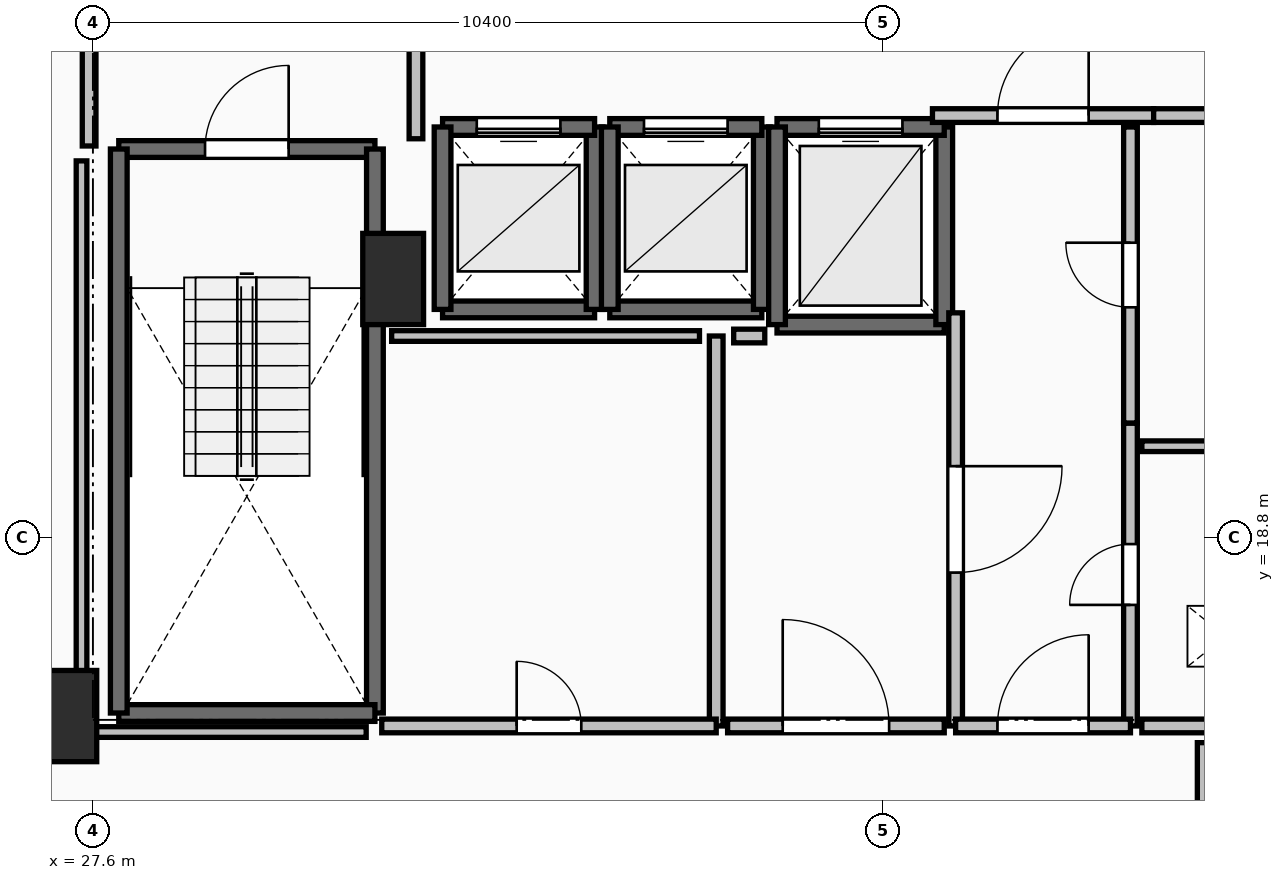
"""IFC4 building model, lengths in metres.
Left out: names, types, materials, properties, quantities, classifications, styles, units other than length and angle.
Written with IfcOpenShell. Run it as: python <this file> out.ifc"""

import sys

from ifc_helpers import new_model, si_unit, direction, frame, frame_2d, origin, origin_2d, place, context, subcontext, project, spatial, rectangle, extrude, element, fill, save


model = new_model("IFC4")
c1 = context("Model", 3, precision=1e-05, world=origin(), true_north=direction((0.0, 1.0)))
c2 = subcontext(c1, "Body", "Model", "MODEL_VIEW")
j1 = project(units=[si_unit("LENGTHUNIT", "METRE"), si_unit("PLANEANGLEUNIT", "RADIAN")], contexts=[c1])
p1 = place(None, origin())
s1 = spatial("IfcSite", under=j1, at=p1, CompositionType="ELEMENT")
p2 = place(p1, origin())
s2 = spatial("IfcBuilding", under=s1, at=p2, CompositionType="ELEMENT")
p3 = place(p2, frame((0.0, 0.0, 164.1)))
s3 = spatial("IfcBuildingStorey", under=s2, at=p3, CompositionType="ELEMENT", Elevation=164.1)
for number, where, z_axis, x_axis in (
    (1, (27.25, 16.45, 0.0), (0.0, 0.0, 1.0), (1.0, 0.0, 0.0)),
    (2, (31.55, 22.2, 0.0), (0.0, 0.0, 1.0), (1.0, 0.0, 0.0)),
):
    element("IfcColumn", number, at=place(p3, frame(where, z_axis=z_axis, x_axis=x_axis)), inside=s3, PredefinedType="PILASTER", context=c2, shape_type="SweptSolid", body=[
        extrude(rectangle(XDim=0.8, YDim=1.2, at=origin_2d()), origin(), (0.0, 0.0, 1.0), 3.5),
    ])
p4 = place(p3, frame((27.94, 23.91, 0.0), z_axis=(0.0, 0.0, 1.0), x_axis=(1.0, 0.0, 0.0)))
e3 = element("IfcWall", 3, at=p4, inside=s3, PredefinedType="SOLIDWALL", context=c2, shape_type="SweptSolid", body=[
    extrude(rectangle(XDim=3.37, YDim=0.22, at=frame_2d((1.685, 0.0))), origin(), (0.0, 0.0, 1.0), 3.24),
])
p5 = place(p4, frame((1.135, 0.0, 0.0)))
e4 = element("IfcOpeningElement", 4, at=p5, cuts=e3, PredefinedType="OPENING", context=c2, shape_type="SweptSolid", body=[
    extrude(rectangle(XDim=1.1, YDim=2.15, at=frame_2d((0.55, 1.075))), frame((0.0, 0.125, 0.0), z_axis=(0.0, -1.0, 0.0), x_axis=(1.0, 0.0, 0.0)), (0.0, 0.0, 1.0), 0.25),
])
p6 = place(p3, frame((31.31, 23.91, 0.0), z_axis=(0.0, 0.0, 1.0), x_axis=(0.0, -1.0, 0.0)))
e5 = element("IfcWall", 5, at=p6, inside=s3, PredefinedType="SOLIDWALL", context=c2, shape_type="SweptSolid", body=[
    extrude(rectangle(XDim=7.42, YDim=0.22, at=frame_2d((3.71, 0.0))), origin(), (0.0, 0.0, 1.0), 3.24),
])
p7 = place(p3, frame((31.31, 16.49, 0.0), z_axis=(0.0, 0.0, 1.0), x_axis=(-1.0, 0.0, 0.0)))
e6 = element("IfcWall", 6, at=p7, inside=s3, PredefinedType="SOLIDWALL", context=c2, shape_type="SweptSolid", body=[
    extrude(rectangle(XDim=3.37, YDim=0.22, at=frame_2d((1.685, 0.0))), origin(), (0.0, 0.0, 1.0), 3.24),
])
p8 = place(p3, frame((27.94, 16.49, 0.0), z_axis=(0.0, 0.0, 1.0), x_axis=(0.0, 1.0, 0.0)))
e7 = element("IfcWall", 7, at=p8, inside=s3, PredefinedType="SOLIDWALL", context=c2, shape_type="SweptSolid", body=[
    extrude(rectangle(XDim=7.42, YDim=0.22, at=frame_2d((3.71, 0.0))), origin(), (0.0, 0.0, 1.0), 3.24),
])
p9 = place(p3, frame((32.2, 21.8, 0.0), z_axis=(0.0, 0.0, 1.0), x_axis=(1.0, 0.0, 0.0)))
e8 = element("IfcWall", 8, at=p9, inside=s3, PredefinedType="SOLIDWALL", context=c2, shape_type="SweptSolid", body=[
    extrude(rectangle(XDim=2.0, YDim=0.22, at=frame_2d((1.0, 0.0))), origin(), (0.0, 0.0, 1.0), 3.24),
])
p10 = place(p3, frame((34.2, 21.8, 0.0), z_axis=(0.0, 0.0, 1.0), x_axis=(0.0, 1.0, 0.0)))
e9 = element("IfcWall", 9, at=p10, inside=s3, PredefinedType="SOLIDWALL", context=c2, shape_type="SweptSolid", body=[
    extrude(rectangle(XDim=2.4, YDim=0.22, at=frame_2d((1.2, 0.0))), origin(), (0.0, 0.0, 1.0), 3.24),
])
p11 = place(p3, frame((34.2, 24.2, 0.0), z_axis=(0.0, 0.0, 1.0), x_axis=(-1.0, 0.0, 0.0)))
e10 = element("IfcWall", 10, at=p11, inside=s3, PredefinedType="SOLIDWALL", context=c2, shape_type="SweptSolid", body=[
    extrude(rectangle(XDim=2.0, YDim=0.22, at=frame_2d((1.0, 0.0))), origin(), (0.0, 0.0, 1.0), 3.24),
])
p12 = place(p11, frame((0.45, 0.0, 0.0)))
e11 = element("IfcOpeningElement", 11, at=p12, cuts=e10, PredefinedType="OPENING", context=c2, shape_type="SweptSolid", body=[
    extrude(rectangle(XDim=1.1, YDim=2.2, at=frame_2d((0.55, 1.1))), frame((0.0, 0.125, 0.0), z_axis=(0.0, -1.0, 0.0), x_axis=(1.0, 0.0, 0.0)), (0.0, 0.0, 1.0), 0.25),
])
p13 = place(p3, frame((32.2, 24.2, 0.0), z_axis=(0.0, 0.0, 1.0), x_axis=(0.0, -1.0, 0.0)))
e12 = element("IfcWall", 12, at=p13, inside=s3, PredefinedType="SOLIDWALL", context=c2, shape_type="SweptSolid", body=[
    extrude(rectangle(XDim=2.4, YDim=0.22, at=frame_2d((1.2, 0.0))), origin(), (0.0, 0.0, 1.0), 3.24),
])
p14 = place(p3, frame((34.4, 21.8, 0.0), z_axis=(0.0, 0.0, 1.0), x_axis=(1.0, 0.0, 0.0)))
e13 = element("IfcWall", 13, at=p14, inside=s3, PredefinedType="SOLIDWALL", context=c2, shape_type="SweptSolid", body=[
    extrude(rectangle(XDim=2.0, YDim=0.22, at=frame_2d((1.0, 0.0))), origin(), (0.0, 0.0, 1.0), 3.24),
])
p15 = place(p3, frame((36.4, 21.8, 0.0), z_axis=(0.0, 0.0, 1.0), x_axis=(0.0, 1.0, 0.0)))
e14 = element("IfcWall", 14, at=p15, inside=s3, PredefinedType="SOLIDWALL", context=c2, shape_type="SweptSolid", body=[
    extrude(rectangle(XDim=2.4, YDim=0.22, at=frame_2d((1.2, 0.0))), origin(), (0.0, 0.0, 1.0), 3.24),
])
p16 = place(p3, frame((36.4, 24.2, 0.0), z_axis=(0.0, 0.0, 1.0), x_axis=(-1.0, 0.0, 0.0)))
e15 = element("IfcWall", 15, at=p16, inside=s3, PredefinedType="SOLIDWALL", context=c2, shape_type="SweptSolid", body=[
    extrude(rectangle(XDim=2.0, YDim=0.22, at=frame_2d((1.0, 0.0))), origin(), (0.0, 0.0, 1.0), 3.24),
])
p17 = place(p16, frame((0.45, 0.0, 0.0)))
e16 = element("IfcOpeningElement", 16, at=p17, cuts=e15, PredefinedType="OPENING", context=c2, shape_type="SweptSolid", body=[
    extrude(rectangle(XDim=1.1, YDim=2.2, at=frame_2d((0.55, 1.1))), frame((0.0, 0.125, 0.0), z_axis=(0.0, -1.0, 0.0), x_axis=(1.0, 0.0, 0.0)), (0.0, 0.0, 1.0), 0.25),
])
p18 = place(p3, frame((34.4, 24.2, 0.0), z_axis=(0.0, 0.0, 1.0), x_axis=(0.0, -1.0, 0.0)))
e17 = element("IfcWall", 17, at=p18, inside=s3, PredefinedType="SOLIDWALL", context=c2, shape_type="SweptSolid", body=[
    extrude(rectangle(XDim=2.4, YDim=0.22, at=frame_2d((1.2, 0.0))), origin(), (0.0, 0.0, 1.0), 3.24),
])
p19 = place(p3, frame((36.6, 21.6, 0.0), z_axis=(0.0, 0.0, 1.0), x_axis=(1.0, 0.0, 0.0)))
e18 = element("IfcWall", 18, at=p19, inside=s3, PredefinedType="SOLIDWALL", context=c2, shape_type="SweptSolid", body=[
    extrude(rectangle(XDim=2.2, YDim=0.22, at=frame_2d((1.1, 0.0))), origin(), (0.0, 0.0, 1.0), 3.24),
])
p20 = place(p3, frame((38.8, 21.6, 0.0), z_axis=(0.0, 0.0, 1.0), x_axis=(0.0, 1.0, 0.0)))
e19 = element("IfcWall", 19, at=p20, inside=s3, PredefinedType="SOLIDWALL", context=c2, shape_type="SweptSolid", body=[
    extrude(rectangle(XDim=2.6, YDim=0.22, at=frame_2d((1.3, 0.0))), origin(), (0.0, 0.0, 1.0), 3.24),
])
p21 = place(p3, frame((38.8, 24.2, 0.0), z_axis=(0.0, 0.0, 1.0), x_axis=(-1.0, 0.0, 0.0)))
e20 = element("IfcWall", 20, at=p21, inside=s3, PredefinedType="SOLIDWALL", context=c2, shape_type="SweptSolid", body=[
    extrude(rectangle(XDim=2.2, YDim=0.22, at=frame_2d((1.1, 0.0))), origin(), (0.0, 0.0, 1.0), 3.24),
])
p22 = place(p21, frame((0.55, 0.0, 0.0)))
e21 = element("IfcOpeningElement", 21, at=p22, cuts=e20, PredefinedType="OPENING", context=c2, shape_type="SweptSolid", body=[
    extrude(rectangle(XDim=1.1, YDim=2.2, at=frame_2d((0.55, 1.1))), frame((0.0, 0.125, 0.0), z_axis=(0.0, -1.0, 0.0), x_axis=(1.0, 0.0, 0.0)), (0.0, 0.0, 1.0), 0.25),
])
p23 = place(p3, frame((36.6, 24.2, 0.0), z_axis=(0.0, 0.0, 1.0), x_axis=(0.0, -1.0, 0.0)))
e22 = element("IfcWall", 22, at=p23, inside=s3, PredefinedType="SOLIDWALL", context=c2, shape_type="SweptSolid", body=[
    extrude(rectangle(XDim=2.6, YDim=0.22, at=frame_2d((1.3, 0.0))), origin(), (0.0, 0.0, 1.0), 3.24),
])
p24 = place(p3, frame((31.85, 24.045, 0.0), z_axis=(0.0, 0.0, 1.0), x_axis=(0.0, 1.0, 0.0)))
e23 = element("IfcWall", 23, at=p24, inside=s3, PredefinedType="PARTITIONING", context=c2, shape_type="SweptSolid", body=[
    extrude(rectangle(XDim=3.91, YDim=0.18, at=frame_2d((1.955, 0.0))), origin(), (0.0, 0.0, 1.0), 3.24),
])
p25 = place(p24, frame((1.355, 0.0, 0.0)))
e24 = element("IfcOpeningElement", 24, at=p25, cuts=e23, PredefinedType="OPENING", context=c2, shape_type="SweptSolid", body=[
    extrude(rectangle(XDim=1.2, YDim=2.15, at=frame_2d((0.6, 1.075))), frame((0.0, 0.105, 0.0), z_axis=(0.0, -1.0, 0.0), x_axis=(1.0, 0.0, 0.0)), (0.0, 0.0, 1.0), 0.21),
])
p26 = place(p3, frame((27.55, 28.0, 0.0), z_axis=(0.0, 0.0, 1.0), x_axis=(0.0, -1.0, 0.0)))
e25 = element("IfcWall", 25, at=p26, inside=s3, PredefinedType="PARTITIONING", context=c2, shape_type="SweptSolid", body=[
    extrude(rectangle(XDim=4.05, YDim=0.18, at=frame_2d((2.025, 0.0))), origin(), (0.0, 0.0, 1.0), 3.24),
])
p27 = place(p26, frame((1.425, 0.0, 0.0)))
e26 = element("IfcOpeningElement", 26, at=p27, cuts=e25, PredefinedType="OPENING", context=c2, shape_type="SweptSolid", body=[
    extrude(rectangle(XDim=1.2, YDim=2.15, at=frame_2d((0.6, 1.075))), frame((0.0, 0.105, 0.0), z_axis=(0.0, -1.0, 0.0), x_axis=(1.0, 0.0, 0.0)), (0.0, 0.0, 1.0), 0.21),
])
p28 = place(p3, frame((38.645, 24.35, 0.0), z_axis=(0.0, 0.0, 1.0), x_axis=(1.0, 0.0, 0.0)))
e27 = element("IfcWall", 27, at=p28, inside=s3, PredefinedType="PARTITIONING", context=c2, shape_type="SweptSolid", body=[
    extrude(rectangle(XDim=2.91, YDim=0.18, at=frame_2d((1.455, 0.0))), origin(), (0.0, 0.0, 1.0), 3.24),
])
p29 = place(p28, frame((0.855, 0.0, 0.0)))
e28 = element("IfcOpeningElement", 28, at=p29, cuts=e27, PredefinedType="OPENING", context=c2, shape_type="SweptSolid", body=[
    extrude(rectangle(XDim=1.2, YDim=2.15, at=frame_2d((0.6, 1.075))), frame((0.0, 0.105, 0.0), z_axis=(0.0, -1.0, 0.0), x_axis=(1.0, 0.0, 0.0)), (0.0, 0.0, 1.0), 0.21),
])
p30 = place(p3, frame((41.555, 24.35, 0.0), z_axis=(0.0, 0.0, 1.0), x_axis=(1.0, 0.0, 0.0)))
e29 = element("IfcWall", 29, at=p30, inside=s3, PredefinedType="PARTITIONING", context=c2, shape_type="SweptSolid", body=[
    extrude(rectangle(XDim=2.445, YDim=0.18, at=frame_2d((1.223, 0.0))), origin(), (0.0, 0.0, 1.0), 3.24),
])
p31 = place(p30, frame((0.798, 0.0, 0.0)))
e30 = element("IfcOpeningElement", 30, at=p31, cuts=e29, PredefinedType="OPENING", context=c2, shape_type="SweptSolid", body=[
    extrude(rectangle(XDim=0.85, YDim=2.1, at=frame_2d((0.425, 1.05))), frame((0.0, 0.105, 0.0), z_axis=(0.0, -1.0, 0.0), x_axis=(1.0, 0.0, 0.0)), (0.0, 0.0, 1.0), 0.21),
])
p32 = place(p3, frame((41.25, 16.32, 0.0), z_axis=(0.0, 0.0, 1.0), x_axis=(0.0, 1.0, 0.0)))
e31 = element("IfcWall", 31, at=p32, inside=s3, PredefinedType="PARTITIONING", context=c2, shape_type="SweptSolid", body=[
    extrude(rectangle(XDim=3.985, YDim=0.18, at=frame_2d((1.992, 0.0))), origin(), (0.0, 0.0, 1.0), 3.24),
])
p33 = place(p32, frame((1.593, 0.0, 0.0)))
e32 = element("IfcOpeningElement", 32, at=p33, cuts=e31, PredefinedType="OPENING", context=c2, shape_type="SweptSolid", body=[
    extrude(rectangle(XDim=0.8, YDim=2.05, at=frame_2d((0.4, 1.025))), frame((0.0, 0.105, 0.0), z_axis=(0.0, -1.0, 0.0), x_axis=(1.0, 0.0, 0.0)), (0.0, 0.0, 1.0), 0.21),
])
p34 = place(p3, frame((41.25, 20.305, 0.0), z_axis=(0.0, 0.0, 1.0), x_axis=(0.0, 1.0, 0.0)))
e33 = element("IfcWall", 33, at=p34, inside=s3, PredefinedType="PARTITIONING", context=c2, shape_type="SweptSolid", body=[
    extrude(rectangle(XDim=3.895, YDim=0.18, at=frame_2d((1.948, 0.0))), origin(), (0.0, 0.0, 1.0), 3.24),
])
p35 = place(p34, frame((1.522, 0.0, 0.0)))
e34 = element("IfcOpeningElement", 34, at=p35, cuts=e33, PredefinedType="OPENING", context=c2, shape_type="SweptSolid", body=[
    extrude(rectangle(XDim=0.85, YDim=2.1, at=frame_2d((0.425, 1.05))), frame((0.0, 0.105, 0.0), z_axis=(0.0, -1.0, 0.0), x_axis=(1.0, 0.0, 0.0)), (0.0, 0.0, 1.0), 0.21),
])
p36 = place(p3, frame((38.95, 21.755, 0.0), z_axis=(0.0, 0.0, 1.0), x_axis=(0.0, -1.0, 0.0)))
e35 = element("IfcWall", 35, at=p36, inside=s3, PredefinedType="PARTITIONING", context=c2, shape_type="SweptSolid", body=[
    extrude(rectangle(XDim=5.435, YDim=0.18, at=frame_2d((2.717, 0.0))), origin(), (0.0, 0.0, 1.0), 3.24),
])
p37 = place(p36, frame((2.018, 0.0, 0.0)))
e36 = element("IfcOpeningElement", 36, at=p37, cuts=e35, PredefinedType="OPENING", context=c2, shape_type="SweptSolid", body=[
    extrude(rectangle(XDim=1.4, YDim=2.2, at=frame_2d((0.7, 1.1))), frame((0.0, 0.105, 0.0), z_axis=(0.0, -1.0, 0.0), x_axis=(1.0, 0.0, 0.0)), (0.0, 0.0, 1.0), 0.21),
])
p38 = place(p3, frame((38.95, 16.32, 0.0), z_axis=(0.0, 0.0, 1.0), x_axis=(1.0, 0.0, 0.0)))
e37 = element("IfcWall", 37, at=p38, inside=s3, PredefinedType="PARTITIONING", context=c2, shape_type="SweptSolid", body=[
    extrude(rectangle(XDim=2.3, YDim=0.18, at=frame_2d((1.15, 0.0))), origin(), (0.0, 0.0, 1.0), 3.24),
])
p39 = place(p38, frame((0.55, 0.0, 0.0)))
e38 = element("IfcOpeningElement", 38, at=p39, cuts=e37, PredefinedType="OPENING", context=c2, shape_type="SweptSolid", body=[
    extrude(rectangle(XDim=1.2, YDim=2.15, at=frame_2d((0.6, 1.075))), frame((0.0, 0.105, 0.0), z_axis=(0.0, -1.0, 0.0), x_axis=(1.0, 0.0, 0.0)), (0.0, 0.0, 1.0), 0.21),
])
p40 = place(p3, frame((44.6, 20.0, 0.0), z_axis=(0.0, 0.0, 1.0), x_axis=(-1.0, 0.0, 0.0)))
e39 = element("IfcWall", 39, at=p40, inside=s3, PredefinedType="PARTITIONING", context=c2, shape_type="SweptSolid", body=[
    extrude(rectangle(XDim=3.2, YDim=0.14, at=frame_2d((1.6, 0.0))), origin(), (0.0, 0.0, 1.0), 3.24),
])
p41 = place(p3, frame((41.4, 16.32, 0.0), z_axis=(0.0, 0.0, 1.0), x_axis=(1.0, 0.0, 0.0)))
e40 = element("IfcWall", 40, at=p41, inside=s3, PredefinedType="PARTITIONING", context=c2, shape_type="SweptSolid", body=[
    extrude(rectangle(XDim=3.2, YDim=0.18, at=frame_2d((1.6, 0.0))), origin(), (0.0, 0.0, 1.0), 3.24),
])
p42 = place(p41, frame((1.2, 0.0, 0.0)))
e41 = element("IfcOpeningElement", 41, at=p42, cuts=e40, PredefinedType="OPENING", context=c2, shape_type="SweptSolid", body=[
    extrude(rectangle(XDim=0.8, YDim=2.05, at=frame_2d((0.4, 1.025))), frame((0.0, 0.105, 0.0), z_axis=(0.0, -1.0, 0.0), x_axis=(1.0, 0.0, 0.0)), (0.0, 0.0, 1.0), 0.21),
])
p43 = place(p3, frame((35.8, 16.32, 0.0), z_axis=(0.0, 0.0, 1.0), x_axis=(0.0, 1.0, 0.0)))
e42 = element("IfcWall", 42, at=p43, inside=s3, PredefinedType="PARTITIONING", context=c2, shape_type="SweptSolid", body=[
    extrude(rectangle(XDim=5.13, YDim=0.18, at=frame_2d((2.565, 0.0))), origin(), (0.0, 0.0, 1.0), 3.24),
])
p44 = place(p3, frame((31.4, 16.32, 0.0), z_axis=(0.0, 0.0, 1.0), x_axis=(1.0, 0.0, 0.0)))
e43 = element("IfcWall", 43, at=p44, inside=s3, PredefinedType="PARTITIONING", context=c2, shape_type="SweptSolid", body=[
    extrude(rectangle(XDim=4.4, YDim=0.18, at=frame_2d((2.2, 0.0))), origin(), (0.0, 0.0, 1.0), 3.24),
])
p45 = place(p44, frame((1.775, 0.0, 0.0)))
e44 = element("IfcOpeningElement", 44, at=p45, cuts=e43, PredefinedType="OPENING", context=c2, shape_type="SweptSolid", body=[
    extrude(rectangle(XDim=0.85, YDim=2.1, at=frame_2d((0.425, 1.05))), frame((0.0, 0.105, 0.0), z_axis=(0.0, -1.0, 0.0), x_axis=(1.0, 0.0, 0.0)), (0.0, 0.0, 1.0), 0.21),
])
p46 = place(p3, frame((35.95, 16.32, 0.0), z_axis=(0.0, 0.0, 1.0), x_axis=(1.0, 0.0, 0.0)))
e45 = element("IfcWall", 45, at=p46, inside=s3, PredefinedType="PARTITIONING", context=c2, shape_type="SweptSolid", body=[
    extrude(rectangle(XDim=2.85, YDim=0.18, at=frame_2d((1.425, 0.0))), origin(), (0.0, 0.0, 1.0), 3.24),
])
p47 = place(p46, frame((0.725, 0.0, 0.0)))
e46 = element("IfcOpeningElement", 46, at=p47, cuts=e45, PredefinedType="OPENING", context=c2, shape_type="SweptSolid", body=[
    extrude(rectangle(XDim=1.4, YDim=2.2, at=frame_2d((0.7, 1.1))), frame((0.0, 0.105, 0.0), z_axis=(0.0, -1.0, 0.0), x_axis=(1.0, 0.0, 0.0)), (0.0, 0.0, 1.0), 0.21),
])
p48 = place(p3, frame((35.58, 21.45, 0.0), z_axis=(0.0, 0.0, 1.0), x_axis=(-1.0, 0.0, 0.0)))
e47 = element("IfcWall", 47, at=p48, inside=s3, PredefinedType="PARTITIONING", context=c2, shape_type="SweptSolid", body=[
    extrude(rectangle(XDim=4.05, YDim=0.14, at=frame_2d((2.025, 0.0))), origin(), (0.0, 0.0, 1.0), 3.24),
])
p49 = place(p3, frame((36.439, 21.45, 0.0), z_axis=(0.0, 0.0, 1.0), x_axis=(-1.0, 0.0, 0.0)))
e48 = element("IfcWall", 48, at=p49, inside=s3, PredefinedType="PARTITIONING", context=c2, shape_type="SweptSolid", body=[
    extrude(rectangle(XDim=0.409, YDim=0.18, at=frame_2d((0.205, 0.0))), origin(), (0.0, 0.0, 1.0), 3.24),
])
p50 = place(p3, frame((27.45, 23.754, 0.0), z_axis=(0.0, 0.0, 1.0), x_axis=(0.0, -1.0, 0.0)))
e49 = element("IfcWall", 49, at=p50, inside=s3, PredefinedType="PARTITIONING", context=c2, shape_type="SweptSolid", body=[
    extrude(rectangle(XDim=7.514, YDim=0.14, at=frame_2d((3.757, 0.0))), origin(), (0.0, 0.0, 1.0), 2.432),
])
p51 = place(p3, frame((27.45, 16.24, 0.0), z_axis=(0.0, 0.0, 1.0), x_axis=(1.0, 0.0, 0.0)))
e50 = element("IfcWall", 50, at=p51, inside=s3, PredefinedType="PARTITIONING", context=c2, shape_type="SweptSolid", body=[
    extrude(rectangle(XDim=3.745, YDim=0.14, at=frame_2d((1.873, 0.0))), origin(), (0.0, 0.0, 1.0), 2.432),
])
p52 = place(p3, frame((42.2, 16.1, 0.0), z_axis=(0.0, 0.0, 1.0), x_axis=(0.0, -1.0, 0.0)))
e51 = element("IfcWall", 51, at=p52, inside=s3, PredefinedType="PARTITIONING", context=c2, shape_type="SweptSolid", body=[
    extrude(rectangle(XDim=1.83, YDim=0.14, at=frame_2d((0.915, 0.0))), origin(), (0.0, 0.0, 1.0), 3.24),
])
p53 = place(p5, origin())
e52 = element("IfcDoor", 52, at=p53, inside=s3, OperationType="SINGLE_SWING_RIGHT", PredefinedType="DOOR", context=c2, shape_type="SweptSolid", body=[
    extrude(rectangle(XDim=1.1, YDim=2.15, at=frame_2d((0.55, 1.075))), frame((0.0, 0.025, 0.0), z_axis=(0.0, -1.0, 0.0), x_axis=(1.0, 0.0, 0.0)), (0.0, 0.0, 1.0), 0.05),
])
fill(e4, e52)
p54 = place(p12, origin())
e53 = element("IfcDoor", 53, at=p54, inside=s3, OperationType="SLIDING_TO_LEFT", PredefinedType="DOOR", context=c2, shape_type="SweptSolid", body=[
    extrude(rectangle(XDim=1.1, YDim=2.2, at=frame_2d((0.55, 1.1))), frame((0.0, 0.025, 0.0), z_axis=(0.0, -1.0, 0.0), x_axis=(1.0, 0.0, 0.0)), (0.0, 0.0, 1.0), 0.05),
])
fill(e11, e53)
p55 = place(p17, origin())
e54 = element("IfcDoor", 54, at=p55, inside=s3, OperationType="SLIDING_TO_LEFT", PredefinedType="DOOR", context=c2, shape_type="SweptSolid", body=[
    extrude(rectangle(XDim=1.1, YDim=2.2, at=frame_2d((0.55, 1.1))), frame((0.0, 0.025, 0.0), z_axis=(0.0, -1.0, 0.0), x_axis=(1.0, 0.0, 0.0)), (0.0, 0.0, 1.0), 0.05),
])
fill(e16, e54)
p56 = place(p22, origin())
e55 = element("IfcDoor", 55, at=p56, inside=s3, OperationType="SLIDING_TO_LEFT", PredefinedType="DOOR", context=c2, shape_type="SweptSolid", body=[
    extrude(rectangle(XDim=1.1, YDim=2.2, at=frame_2d((0.55, 1.1))), frame((0.0, 0.025, 0.0), z_axis=(0.0, -1.0, 0.0), x_axis=(1.0, 0.0, 0.0)), (0.0, 0.0, 1.0), 0.05),
])
fill(e21, e55)
p57 = place(p29, origin())
e56 = element("IfcDoor", 56, at=p57, inside=s3, OperationType="SINGLE_SWING_RIGHT", PredefinedType="DOOR", context=c2, shape_type="SweptSolid", body=[
    extrude(rectangle(XDim=1.2, YDim=2.15, at=frame_2d((0.6, 1.075))), frame((0.0, 0.025, 0.0), z_axis=(0.0, -1.0, 0.0), x_axis=(1.0, 0.0, 0.0)), (0.0, 0.0, 1.0), 0.05),
])
fill(e28, e56)
p58 = place(p33, origin())
e57 = element("IfcDoor", 57, at=p58, inside=s3, OperationType="SINGLE_SWING_LEFT", PredefinedType="DOOR", context=c2, shape_type="SweptSolid", body=[
    extrude(rectangle(XDim=0.8, YDim=2.05, at=frame_2d((0.4, 1.025))), frame((0.0, 0.025, 0.0), z_axis=(0.0, -1.0, 0.0), x_axis=(1.0, 0.0, 0.0)), (0.0, 0.0, 1.0), 0.05),
])
fill(e32, e57)
p59 = place(p35, origin())
e58 = element("IfcDoor", 58, at=p59, inside=s3, OperationType="SINGLE_SWING_RIGHT", PredefinedType="DOOR", context=c2, shape_type="SweptSolid", body=[
    extrude(rectangle(XDim=0.85, YDim=2.1, at=frame_2d((0.425, 1.05))), frame((0.0, 0.025, 0.0), z_axis=(0.0, -1.0, 0.0), x_axis=(1.0, 0.0, 0.0)), (0.0, 0.0, 1.0), 0.05),
])
fill(e34, e58)
p60 = place(p37, origin())
e59 = element("IfcDoor", 59, at=p60, inside=s3, OperationType="DOUBLE_SWING_LEFT", PredefinedType="DOOR", context=c2, shape_type="SweptSolid", body=[
    extrude(rectangle(XDim=1.4, YDim=2.2, at=frame_2d((0.7, 1.1))), frame((0.0, 0.025, 0.0), z_axis=(0.0, -1.0, 0.0), x_axis=(1.0, 0.0, 0.0)), (0.0, 0.0, 1.0), 0.05),
])
fill(e36, e59)
p61 = place(p39, origin())
e60 = element("IfcDoor", 60, at=p61, inside=s3, OperationType="SINGLE_SWING_RIGHT", PredefinedType="DOOR", context=c2, shape_type="SweptSolid", body=[
    extrude(rectangle(XDim=1.2, YDim=2.15, at=frame_2d((0.6, 1.075))), frame((0.0, 0.025, 0.0), z_axis=(0.0, -1.0, 0.0), x_axis=(1.0, 0.0, 0.0)), (0.0, 0.0, 1.0), 0.05),
])
fill(e38, e60)
p62 = place(p45, origin())
e61 = element("IfcDoor", 61, at=p62, inside=s3, OperationType="SINGLE_SWING_LEFT", PredefinedType="DOOR", context=c2, shape_type="SweptSolid", body=[
    extrude(rectangle(XDim=0.85, YDim=2.1, at=frame_2d((0.425, 1.05))), frame((0.0, 0.025, 0.0), z_axis=(0.0, -1.0, 0.0), x_axis=(1.0, 0.0, 0.0)), (0.0, 0.0, 1.0), 0.05),
])
fill(e44, e61)
p63 = place(p47, origin())
e62 = element("IfcDoor", 62, at=p63, inside=s3, OperationType="DOUBLE_SWING_LEFT", PredefinedType="DOOR", context=c2, shape_type="SweptSolid", body=[
    extrude(rectangle(XDim=1.4, YDim=2.2, at=frame_2d((0.7, 1.1))), frame((0.0, 0.025, 0.0), z_axis=(0.0, -1.0, 0.0), x_axis=(1.0, 0.0, 0.0)), (0.0, 0.0, 1.0), 0.05),
])
fill(e46, e62)
save(model, sys.argv[1])
